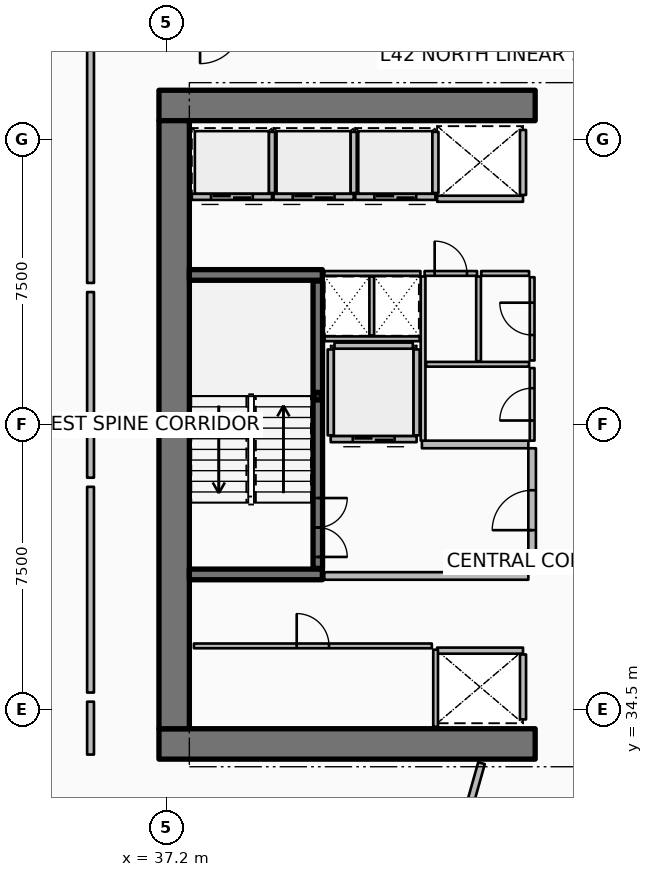
"""IFC4 building model, lengths in metres.
Left out: names, types, materials, properties, quantities, classifications, styles, units other than length and angle.
Written with IfcOpenShell. Run it as: python <this file> out.ifc"""

import sys

from ifc_helpers import new_model, si_unit, direction, frame, frame_2d, origin, origin_2d, place, context, subcontext, project, spatial, rectangle, hollow_rectangle, extrude, element, fill, save


model = new_model("IFC4")
c1 = context("Model", 3, precision=1e-05, world=origin(), true_north=direction((0.0, 1.0)))
c2 = subcontext(c1, "Body", "Model", "MODEL_VIEW")
j1 = project(units=[si_unit("LENGTHUNIT", "METRE"), si_unit("PLANEANGLEUNIT", "RADIAN")], contexts=[c1])
p1 = place(None, origin())
s1 = spatial("IfcSite", under=j1, at=p1, CompositionType="ELEMENT")
p2 = place(p1, origin())
s2 = spatial("IfcBuilding", under=s1, at=p2, CompositionType="ELEMENT")
p3 = place(p2, frame((0.0, 0.0, 169.05)))
s3 = spatial("IfcBuildingStorey", under=s2, at=p3, CompositionType="ELEMENT", Elevation=169.05)
for number, where, z_axis, x_axis in (
    (1, (37.0, 33.6, 0.0), (0.0, 0.0, 1.0), (1.0, 0.0, 0.0)),
    (2, (37.0, 50.4, 0.0), (0.0, 0.0, 1.0), (1.0, 0.0, 0.0)),
):
    element("IfcWall", number, at=place(p3, frame(where, z_axis=z_axis, x_axis=x_axis)), inside=s3, PredefinedType="SHEAR", context=c2, shape_type="SweptSolid", body=[
        extrude(rectangle(XDim=9.9, YDim=0.8, at=frame_2d((4.95, 0.0))), origin(), (0.0, 0.0, 1.0), 3.75),
    ])
p4 = place(p3, frame((37.4, 34.0, 0.0), z_axis=(0.0, 0.0, 1.0), x_axis=(0.0, 1.0, 0.0)))
e3 = element("IfcWall", 3, at=p4, inside=s3, PredefinedType="SHEAR", context=c2, shape_type="SweptSolid", body=[
    extrude(rectangle(XDim=16.0, YDim=0.8, at=frame_2d((8.0, 0.0))), origin(), (0.0, 0.0, 1.0), 3.75),
])
for number, where, z_axis, x_axis in (
    (4, (37.8, 38.06, 0.0), (0.0, 0.0, 1.0), (1.0, 0.0, 0.0)),
    (5, (37.8, 45.94, 0.0), (0.0, 0.0, 1.0), (1.0, 0.0, 0.0)),
):
    element("IfcWall", number, at=place(p3, frame(where, z_axis=z_axis, x_axis=x_axis)), inside=s3, PredefinedType="SHEAR", context=c2, shape_type="SweptSolid", body=[
        extrude(rectangle(XDim=3.5, YDim=0.28, at=frame_2d((1.75, 0.0))), origin(), (0.0, 0.0, 1.0), 3.75),
    ])
p5 = place(p3, frame((41.18, 42.75, 0.0), z_axis=(0.0, 0.0, 1.0), x_axis=(1.0, 0.0, 0.0)))
e6 = element("IfcColumn", 6, at=p5, inside=s3, PredefinedType="COLUMN", context=c2, shape_type="SweptSolid", body=[
    extrude(hollow_rectangle(XDim=0.2, YDim=0.2, WallThickness=0.01, InnerFilletRadius=0.01, OuterFilletRadius=0.02, at=origin_2d()), origin(), (0.0, 0.0, 1.0), 1.67),
])
p6 = place(p3, frame((41.18, 38.22, 0.0), z_axis=(0.0, 0.0, 1.0), x_axis=(0.0, 1.0, 0.0)))
e7 = element("IfcWall", 7, at=p6, inside=s3, PredefinedType="SOLIDWALL", context=c2, shape_type="SweptSolid", body=[
    extrude(rectangle(XDim=7.56, YDim=0.25, at=frame_2d((3.78, 0.0))), origin(), (0.0, 0.0, 1.0), 3.5),
])
p7 = place(p6, frame((0.3, 0.0, 0.0)))
e8 = element("IfcOpeningElement", 8, at=p7, cuts=e7, PredefinedType="OPENING", context=c2, shape_type="SweptSolid", body=[
    extrude(rectangle(XDim=1.55, YDim=2.15, at=frame_2d((0.775, 1.075))), frame((0.0, 0.135, 0.0), z_axis=(0.0, -1.0, 0.0), x_axis=(1.0, 0.0, 0.0)), (0.0, 0.0, 1.0), 0.27),
])
p8 = place(p3, frame((39.975, 47.995, 0.0), z_axis=(0.0, 0.0, 1.0), x_axis=(-1.0, 0.0, 0.0)))
e9 = element("IfcWall", 9, at=p8, inside=s3, PredefinedType="PARTITIONING", context=c2, shape_type="SweptSolid", body=[
    extrude(rectangle(XDim=2.11, YDim=0.16, at=frame_2d((1.055, 0.0))), origin(), (0.0, 0.0, 1.0), 3.5),
])
p9 = place(p8, frame((0.505, 0.0, 0.0)))
e10 = element("IfcOpeningElement", 10, at=p9, cuts=e9, PredefinedType="OPENING", context=c2, shape_type="SweptSolid", body=[
    extrude(rectangle(XDim=1.1, YDim=2.1, at=frame_2d((0.55, 1.05))), frame((0.0, 0.09, 0.0), z_axis=(0.0, -1.0, 0.0), x_axis=(1.0, 0.0, 0.0)), (0.0, 0.0, 1.0), 0.18),
])
p10 = place(p3, frame((39.975, 48.095, 0.0), z_axis=(0.0, 0.0, 1.0), x_axis=(0.0, 1.0, 0.0)))
e11 = element("IfcWall", 11, at=p10, inside=s3, PredefinedType="PARTITIONING", context=c2, shape_type="SweptSolid", body=[
    extrude(rectangle(XDim=1.61, YDim=0.16, at=frame_2d((0.805, 0.0))), origin(), (0.0, 0.0, 1.0), 3.5),
])
p11 = place(p3, frame((42.125, 47.995, 0.0), z_axis=(0.0, 0.0, 1.0), x_axis=(-1.0, 0.0, 0.0)))
e12 = element("IfcWall", 12, at=p11, inside=s3, PredefinedType="PARTITIONING", context=c2, shape_type="SweptSolid", body=[
    extrude(rectangle(XDim=2.11, YDim=0.16, at=frame_2d((1.055, 0.0))), origin(), (0.0, 0.0, 1.0), 3.5),
])
p12 = place(p11, frame((0.505, 0.0, 0.0)))
e13 = element("IfcOpeningElement", 13, at=p12, cuts=e12, PredefinedType="OPENING", context=c2, shape_type="SweptSolid", body=[
    extrude(rectangle(XDim=1.1, YDim=2.1, at=frame_2d((0.55, 1.05))), frame((0.0, 0.09, 0.0), z_axis=(0.0, -1.0, 0.0), x_axis=(1.0, 0.0, 0.0)), (0.0, 0.0, 1.0), 0.18),
])
p13 = place(p3, frame((42.125, 48.095, 0.0), z_axis=(0.0, 0.0, 1.0), x_axis=(0.0, 1.0, 0.0)))
e14 = element("IfcWall", 14, at=p13, inside=s3, PredefinedType="PARTITIONING", context=c2, shape_type="SweptSolid", body=[
    extrude(rectangle(XDim=1.61, YDim=0.16, at=frame_2d((0.805, 0.0))), origin(), (0.0, 0.0, 1.0), 3.5),
])
p14 = place(p3, frame((44.275, 47.995, 0.0), z_axis=(0.0, 0.0, 1.0), x_axis=(-1.0, 0.0, 0.0)))
e15 = element("IfcWall", 15, at=p14, inside=s3, PredefinedType="PARTITIONING", context=c2, shape_type="SweptSolid", body=[
    extrude(rectangle(XDim=2.11, YDim=0.16, at=frame_2d((1.055, 0.0))), origin(), (0.0, 0.0, 1.0), 3.5),
])
p15 = place(p14, frame((0.505, 0.0, 0.0)))
e16 = element("IfcOpeningElement", 16, at=p15, cuts=e15, PredefinedType="OPENING", context=c2, shape_type="SweptSolid", body=[
    extrude(rectangle(XDim=1.1, YDim=2.1, at=frame_2d((0.55, 1.05))), frame((0.0, 0.09, 0.0), z_axis=(0.0, -1.0, 0.0), x_axis=(1.0, 0.0, 0.0)), (0.0, 0.0, 1.0), 0.18),
])
p16 = place(p3, frame((44.275, 48.095, 0.0), z_axis=(0.0, 0.0, 1.0), x_axis=(0.0, 1.0, 0.0)))
e17 = element("IfcWall", 17, at=p16, inside=s3, PredefinedType="PARTITIONING", context=c2, shape_type="SweptSolid", body=[
    extrude(rectangle(XDim=1.61, YDim=0.16, at=frame_2d((0.805, 0.0))), origin(), (0.0, 0.0, 1.0), 3.5),
])
p17 = place(p3, frame((46.58, 47.945, 0.0), z_axis=(0.0, 0.0, 1.0), x_axis=(-1.0, 0.0, 0.0)))
e18 = element("IfcWall", 18, at=p17, inside=s3, PredefinedType="PARTITIONING", context=c2, shape_type="SweptSolid", body=[
    extrude(rectangle(XDim=2.26, YDim=0.16, at=frame_2d((1.13, 0.0))), origin(), (0.0, 0.0, 1.0), 3.5),
])
p18 = place(p3, frame((46.58, 48.045, 0.0), z_axis=(0.0, 0.0, 1.0), x_axis=(0.0, 1.0, 0.0)))
e19 = element("IfcWall", 19, at=p18, inside=s3, PredefinedType="PARTITIONING", context=c2, shape_type="SweptSolid", body=[
    extrude(rectangle(XDim=1.71, YDim=0.16, at=frame_2d((0.855, 0.0))), origin(), (0.0, 0.0, 1.0), 3.5),
])
p19 = place(p3, frame((44.32, 36.055, 0.0), z_axis=(0.0, 0.0, 1.0), x_axis=(1.0, 0.0, 0.0)))
e20 = element("IfcWall", 20, at=p19, inside=s3, PredefinedType="PARTITIONING", context=c2, shape_type="SweptSolid", body=[
    extrude(rectangle(XDim=2.26, YDim=0.16, at=frame_2d((1.13, 0.0))), origin(), (0.0, 0.0, 1.0), 3.5),
])
p20 = place(p3, frame((46.58, 34.245, 0.0), z_axis=(0.0, 0.0, 1.0), x_axis=(0.0, 1.0, 0.0)))
e21 = element("IfcWall", 21, at=p20, inside=s3, PredefinedType="PARTITIONING", context=c2, shape_type="SweptSolid", body=[
    extrude(rectangle(XDim=1.71, YDim=0.16, at=frame_2d((0.855, 0.0))), origin(), (0.0, 0.0, 1.0), 3.5),
])
p21 = place(p3, frame((43.78, 41.62, 0.0), z_axis=(0.0, 0.0, 1.0), x_axis=(-1.0, 0.0, 0.0)))
e22 = element("IfcWall", 22, at=p21, inside=s3, PredefinedType="PARTITIONING", context=c2, shape_type="SweptSolid", body=[
    extrude(rectangle(XDim=2.26, YDim=0.16, at=frame_2d((1.13, 0.0))), origin(), (0.0, 0.0, 1.0), 3.5),
])
p22 = place(p21, frame((0.58, 0.0, 0.0)))
e23 = element("IfcOpeningElement", 23, at=p22, cuts=e22, PredefinedType="OPENING", context=c2, shape_type="SweptSolid", body=[
    extrude(rectangle(XDim=1.1, YDim=2.1, at=frame_2d((0.55, 1.05))), frame((0.0, 0.09, 0.0), z_axis=(0.0, -1.0, 0.0), x_axis=(1.0, 0.0, 0.0)), (0.0, 0.0, 1.0), 0.18),
])
for number, where, z_axis, x_axis in (
    (24, (43.78, 41.72, 0.0), (0.0, 0.0, 1.0), (0.0, 1.0, 0.0)),
    (25, (41.52, 41.72, 0.0), (0.0, 0.0, 1.0), (0.0, 1.0, 0.0)),
):
    element("IfcWall", number, at=place(p3, frame(where, z_axis=z_axis, x_axis=x_axis)), inside=s3, PredefinedType="PARTITIONING", context=c2, shape_type="SweptSolid", body=[
        extrude(rectangle(XDim=2.26, YDim=0.16, at=frame_2d((1.13, 0.0))), origin(), (0.0, 0.0, 1.0), 3.5),
    ])
p23 = place(p3, frame((41.62, 44.08, 0.0), z_axis=(0.0, 0.0, 1.0), x_axis=(1.0, 0.0, 0.0)))
e26 = element("IfcWall", 26, at=p23, inside=s3, PredefinedType="PARTITIONING", context=c2, shape_type="SweptSolid", body=[
    extrude(rectangle(XDim=2.06, YDim=0.16, at=frame_2d((1.03, 0.0))), origin(), (0.0, 0.0, 1.0), 3.5),
])
p24 = place(p3, frame((44.28, 34.05, 0.0), z_axis=(0.0, 0.0, 1.0), x_axis=(0.0, 1.0, 0.0)))
e27 = element("IfcWall", 27, at=p24, inside=s3, PredefinedType="PARTITIONING", context=c2, shape_type="SweptSolid", body=[
    extrude(rectangle(XDim=2.03, YDim=0.125, at=frame_2d((1.015, 0.0))), origin(), (0.0, 0.0, 1.0), 2.94),
])
p25 = place(p3, frame((37.92, 36.18, 0.0), z_axis=(0.0, 0.0, 1.0), x_axis=(1.0, 0.0, 0.0)))
e28 = element("IfcWall", 28, at=p25, inside=s3, PredefinedType="PARTITIONING", context=c2, shape_type="SweptSolid", body=[
    extrude(rectangle(XDim=6.26, YDim=0.125, at=frame_2d((3.13, 0.0))), origin(), (0.0, 0.0, 1.0), 2.94),
])
p26 = place(p25, frame((2.705, 0.0, 0.0)))
e29 = element("IfcOpeningElement", 29, at=p26, cuts=e28, PredefinedType="OPENING", context=c2, shape_type="SweptSolid", body=[
    extrude(rectangle(XDim=0.85, YDim=2.06, at=frame_2d((0.425, 1.03))), frame((0.0, 0.073, 0.0), z_axis=(0.0, -1.0, 0.0), x_axis=(1.0, 0.0, 0.0)), (0.0, 0.0, 1.0), 0.145),
])
p27 = place(p3, frame((41.35, 38.02, 0.0), z_axis=(0.0, 0.0, 1.0), x_axis=(1.0, 0.0, 0.0)))
e30 = element("IfcWall", 30, at=p27, inside=s3, PredefinedType="PARTITIONING", context=c2, shape_type="SweptSolid", body=[
    extrude(rectangle(XDim=5.37, YDim=0.2, at=frame_2d((2.685, 0.0))), origin(), (0.0, 0.0, 1.0), 3.5),
])
p28 = place(p3, frame((43.92, 41.48, 0.0), z_axis=(0.0, 0.0, 1.0), x_axis=(1.0, 0.0, 0.0)))
e31 = element("IfcWall", 31, at=p28, inside=s3, PredefinedType="PARTITIONING", context=c2, shape_type="SweptSolid", body=[
    extrude(rectangle(XDim=2.8, YDim=0.2, at=frame_2d((1.4, 0.0))), origin(), (0.0, 0.0, 1.0), 3.5),
])
p29 = place(p3, frame((46.82, 38.12, 0.0), z_axis=(0.0, 0.0, 1.0), x_axis=(0.0, 1.0, 0.0)))
e32 = element("IfcWall", 32, at=p29, inside=s3, PredefinedType="PARTITIONING", context=c2, shape_type="SweptSolid", body=[
    extrude(rectangle(XDim=3.26, YDim=0.2, at=frame_2d((1.63, 0.0))), origin(), (0.0, 0.0, 1.0), 3.5),
])
p30 = place(p29, frame((1.105, 0.0, 0.0)))
e33 = element("IfcOpeningElement", 33, at=p30, cuts=e32, PredefinedType="OPENING", context=c2, shape_type="SweptSolid", body=[
    extrude(rectangle(XDim=1.05, YDim=2.1, at=frame_2d((0.525, 1.05))), frame((0.0, 0.11, 0.0), z_axis=(0.0, -1.0, 0.0), x_axis=(1.0, 0.0, 0.0)), (0.0, 0.0, 1.0), 0.22),
])
p31 = place(p3, frame((41.36, 44.26, 0.0), z_axis=(0.0, 0.0, 1.0), x_axis=(1.0, 0.0, 0.0)))
e34 = element("IfcWall", 34, at=p31, inside=s3, PredefinedType="PARTITIONING", context=c2, shape_type="SweptSolid", body=[
    extrude(rectangle(XDim=2.5, YDim=0.125, at=frame_2d((1.25, 0.0))), origin(), (0.0, 0.0, 1.0), 2.94),
])
p32 = place(p3, frame((42.6, 44.35, 0.0), z_axis=(0.0, 0.0, 1.0), x_axis=(0.0, 1.0, 0.0)))
e35 = element("IfcWall", 35, at=p32, inside=s3, PredefinedType="PARTITIONING", context=c2, shape_type="SweptSolid", body=[
    extrude(rectangle(XDim=1.55, YDim=0.125, at=frame_2d((0.775, 0.0))), origin(), (0.0, 0.0, 1.0), 2.94),
])
p33 = place(p3, frame((43.95, 41.58, 0.0), z_axis=(0.0, 0.0, 1.0), x_axis=(0.0, 1.0, 0.0)))
e36 = element("IfcWall", 36, at=p33, inside=s3, PredefinedType="PARTITIONING", context=c2, shape_type="SweptSolid", body=[
    extrude(rectangle(XDim=4.32, YDim=0.125, at=frame_2d((2.16, 0.0))), origin(), (0.0, 0.0, 1.0), 2.94),
])
p34 = place(p3, frame((44.03, 43.59, 0.0), z_axis=(0.0, 0.0, 1.0), x_axis=(1.0, 0.0, 0.0)))
e37 = element("IfcWall", 37, at=p34, inside=s3, PredefinedType="PARTITIONING", context=c2, shape_type="SweptSolid", body=[
    extrude(rectangle(XDim=2.71, YDim=0.125, at=frame_2d((1.355, 0.0))), origin(), (0.0, 0.0, 1.0), 2.94),
])
p35 = place(p3, frame((45.41, 43.67, 0.0), z_axis=(0.0, 0.0, 1.0), x_axis=(0.0, 1.0, 0.0)))
e38 = element("IfcWall", 38, at=p35, inside=s3, PredefinedType="PARTITIONING", context=c2, shape_type="SweptSolid", body=[
    extrude(rectangle(XDim=2.23, YDim=0.125, at=frame_2d((1.115, 0.0))), origin(), (0.0, 0.0, 1.0), 2.94),
])
p36 = place(p3, frame((46.82, 41.58, 0.0), z_axis=(0.0, 0.0, 1.0), x_axis=(0.0, 1.0, 0.0)))
e39 = element("IfcWall", 39, at=p36, inside=s3, PredefinedType="PARTITIONING", context=c2, shape_type="SweptSolid", body=[
    extrude(rectangle(XDim=1.91, YDim=0.125, at=frame_2d((0.955, 0.0))), origin(), (0.0, 0.0, 1.0), 2.94),
])
p37 = place(p36, frame((0.53, 0.0, 0.0)))
e40 = element("IfcOpeningElement", 40, at=p37, cuts=e39, PredefinedType="OPENING", context=c2, shape_type="SweptSolid", body=[
    extrude(rectangle(XDim=0.85, YDim=2.06, at=frame_2d((0.425, 1.03))), frame((0.0, 0.073, 0.0), z_axis=(0.0, -1.0, 0.0), x_axis=(1.0, 0.0, 0.0)), (0.0, 0.0, 1.0), 0.145),
])
p38 = place(p3, frame((46.82, 43.69, 0.0), z_axis=(0.0, 0.0, 1.0), x_axis=(0.0, 1.0, 0.0)))
e41 = element("IfcWall", 41, at=p38, inside=s3, PredefinedType="PARTITIONING", context=c2, shape_type="SweptSolid", body=[
    extrude(rectangle(XDim=2.19, YDim=0.125, at=frame_2d((1.095, 0.0))), origin(), (0.0, 0.0, 1.0), 2.94),
])
p39 = place(p38, frame((0.67, 0.0, 0.0)))
e42 = element("IfcOpeningElement", 42, at=p39, cuts=e41, PredefinedType="OPENING", context=c2, shape_type="SweptSolid", body=[
    extrude(rectangle(XDim=0.85, YDim=2.06, at=frame_2d((0.425, 1.03))), frame((0.0, 0.073, 0.0), z_axis=(0.0, -1.0, 0.0), x_axis=(1.0, 0.0, 0.0)), (0.0, 0.0, 1.0), 0.145),
])
p40 = place(p3, frame((41.35, 45.98, 0.0), z_axis=(0.0, 0.0, 1.0), x_axis=(1.0, 0.0, 0.0)))
e43 = element("IfcWall", 43, at=p40, inside=s3, PredefinedType="PARTITIONING", context=c2, shape_type="SweptSolid", body=[
    extrude(rectangle(XDim=2.53, YDim=0.125, at=frame_2d((1.265, 0.0))), origin(), (0.0, 0.0, 1.0), 2.94),
])
p41 = place(p3, frame((43.99, 45.98, 0.0), z_axis=(0.0, 0.0, 1.0), x_axis=(1.0, 0.0, 0.0)))
e44 = element("IfcWall", 44, at=p41, inside=s3, PredefinedType="PARTITIONING", context=c2, shape_type="SweptSolid", body=[
    extrude(rectangle(XDim=1.38, YDim=0.125, at=frame_2d((0.69, 0.0))), origin(), (0.0, 0.0, 1.0), 2.94),
])
p42 = place(p41, frame((0.265, 0.0, 0.0)))
e45 = element("IfcOpeningElement", 45, at=p42, cuts=e44, PredefinedType="OPENING", context=c2, shape_type="SweptSolid", body=[
    extrude(rectangle(XDim=0.85, YDim=2.06, at=frame_2d((0.425, 1.03))), frame((0.0, 0.073, 0.0), z_axis=(0.0, -1.0, 0.0), x_axis=(1.0, 0.0, 0.0)), (0.0, 0.0, 1.0), 0.145),
])
p43 = place(p3, frame((45.48, 45.98, 0.0), z_axis=(0.0, 0.0, 1.0), x_axis=(1.0, 0.0, 0.0)))
e46 = element("IfcWall", 46, at=p43, inside=s3, PredefinedType="PARTITIONING", context=c2, shape_type="SweptSolid", body=[
    extrude(rectangle(XDim=1.26, YDim=0.125, at=frame_2d((0.63, 0.0))), origin(), (0.0, 0.0, 1.0), 2.94),
])
p44 = place(p3, frame((45.488, 33.094, 0.0), z_axis=(0.0, 0.0, 1.0), x_axis=(-0.271442952208, -0.962454530717, 0.0)))
e47 = element("IfcWall", 47, at=p44, inside=s3, PredefinedType="PARTITIONING", context=c2, shape_type="SweptSolid", body=[
    extrude(rectangle(XDim=14.486, YDim=0.18, at=frame_2d((7.243, 0.0))), origin(), (0.0, 0.0, 1.0), 2.94),
])
p45 = place(p3, frame((35.2, 51.971, 0.0), z_axis=(0.0, 0.0, 1.0), x_axis=(0.0, -1.0, 0.0)))
e48 = element("IfcWall", 48, at=p45, inside=s3, PredefinedType="PARTITIONING", context=c2, shape_type="SweptSolid", body=[
    extrude(rectangle(XDim=6.241, YDim=0.18, at=frame_2d((3.12, 0.0))), origin(), (0.0, 0.0, 1.0), 2.94),
])
p46 = place(p3, frame((35.2, 45.49, 0.0), z_axis=(0.0, 0.0, 1.0), x_axis=(0.0, -1.0, 0.0)))
e49 = element("IfcWall", 49, at=p46, inside=s3, PredefinedType="PARTITIONING", context=c2, shape_type="SweptSolid", body=[
    extrude(rectangle(XDim=4.885, YDim=0.18, at=frame_2d((2.442, 0.0))), origin(), (0.0, 0.0, 1.0), 2.94),
])
p47 = place(p3, frame((35.2, 40.365, 0.0), z_axis=(0.0, 0.0, 1.0), x_axis=(0.0, -1.0, 0.0)))
e50 = element("IfcWall", 50, at=p47, inside=s3, PredefinedType="PARTITIONING", context=c2, shape_type="SweptSolid", body=[
    extrude(rectangle(XDim=5.413, YDim=0.18, at=frame_2d((2.707, 0.0))), origin(), (0.0, 0.0, 1.0), 2.94),
])
p48 = place(p3, frame((35.2, 34.712, 0.0), z_axis=(0.0, 0.0, 1.0), x_axis=(0.0, -1.0, 0.0)))
e51 = element("IfcWall", 51, at=p48, inside=s3, PredefinedType="PARTITIONING", context=c2, shape_type="SweptSolid", body=[
    extrude(rectangle(XDim=1.392, YDim=0.18, at=frame_2d((0.696, 0.0))), origin(), (0.0, 0.0, 1.0), 2.94),
])
p49 = place(p3, frame((31.983, 32.907, 0.0), z_axis=(0.0, 0.0, 1.0), x_axis=(0.649447060425, -0.76040680935, 0.0)))
e52 = element("IfcWall", 52, at=p49, inside=s3, PredefinedType="PARTITIONING", context=c2, shape_type="SweptSolid", body=[
    extrude(rectangle(XDim=6.975, YDim=0.125, at=frame_2d((3.487, 0.0))), origin(), (0.0, 0.0, 1.0), 2.94),
])
p50 = place(p49, frame((3.037, 0.0, 0.0)))
e53 = element("IfcOpeningElement", 53, at=p50, cuts=e52, PredefinedType="OPENING", context=c2, shape_type="SweptSolid", body=[
    extrude(rectangle(XDim=0.9, YDim=2.08, at=frame_2d((0.45, 1.04))), frame((0.0, 0.073, 0.0), z_axis=(0.0, -1.0, 0.0), x_axis=(1.0, 0.0, 0.0)), (0.0, 0.0, 1.0), 0.145),
])
p51 = place(p7, origin())
e54 = element("IfcDoor", 54, at=p51, inside=s3, OperationType="DOUBLE_DOOR_SINGLE_SWING", PredefinedType="DOOR", context=c2, shape_type="SweptSolid", body=[
    extrude(rectangle(XDim=1.55, YDim=2.15, at=frame_2d((0.775, 1.075))), frame((0.0, 0.025, 0.0), z_axis=(0.0, -1.0, 0.0), x_axis=(1.0, 0.0, 0.0)), (0.0, 0.0, 1.0), 0.05),
])
fill(e8, e54)
p52 = place(p9, origin())
e55 = element("IfcDoor", 55, at=p52, inside=s3, OperationType="DOUBLE_DOOR_SLIDING", PredefinedType="DOOR", context=c2, shape_type="SweptSolid", body=[
    extrude(rectangle(XDim=1.1, YDim=2.1, at=frame_2d((0.55, 1.05))), frame((0.0, 0.025, 0.0), z_axis=(0.0, -1.0, 0.0), x_axis=(1.0, 0.0, 0.0)), (0.0, 0.0, 1.0), 0.05),
])
fill(e10, e55)
p53 = place(p12, origin())
e56 = element("IfcDoor", 56, at=p53, inside=s3, OperationType="DOUBLE_DOOR_SLIDING", PredefinedType="DOOR", context=c2, shape_type="SweptSolid", body=[
    extrude(rectangle(XDim=1.1, YDim=2.1, at=frame_2d((0.55, 1.05))), frame((0.0, 0.025, 0.0), z_axis=(0.0, -1.0, 0.0), x_axis=(1.0, 0.0, 0.0)), (0.0, 0.0, 1.0), 0.05),
])
fill(e13, e56)
p54 = place(p15, origin())
e57 = element("IfcDoor", 57, at=p54, inside=s3, OperationType="DOUBLE_DOOR_SLIDING", PredefinedType="DOOR", context=c2, shape_type="SweptSolid", body=[
    extrude(rectangle(XDim=1.1, YDim=2.1, at=frame_2d((0.55, 1.05))), frame((0.0, 0.025, 0.0), z_axis=(0.0, -1.0, 0.0), x_axis=(1.0, 0.0, 0.0)), (0.0, 0.0, 1.0), 0.05),
])
fill(e16, e57)
p55 = place(p22, origin())
e58 = element("IfcDoor", 58, at=p55, inside=s3, OperationType="DOUBLE_DOOR_SLIDING", PredefinedType="DOOR", context=c2, shape_type="SweptSolid", body=[
    extrude(rectangle(XDim=1.1, YDim=2.1, at=frame_2d((0.55, 1.05))), frame((0.0, 0.025, 0.0), z_axis=(0.0, -1.0, 0.0), x_axis=(1.0, 0.0, 0.0)), (0.0, 0.0, 1.0), 0.05),
])
fill(e23, e58)
p56 = place(p26, origin())
e59 = element("IfcDoor", 59, at=p56, inside=s3, OperationType="SINGLE_SWING_LEFT", PredefinedType="DOOR", context=c2, shape_type="SweptSolid", body=[
    extrude(rectangle(XDim=0.85, YDim=2.06, at=frame_2d((0.425, 1.03))), frame((0.0, 0.025, 0.0), z_axis=(0.0, -1.0, 0.0), x_axis=(1.0, 0.0, 0.0)), (0.0, 0.0, 1.0), 0.05),
])
fill(e29, e59)
p57 = place(p30, origin())
e60 = element("IfcDoor", 60, at=p57, inside=s3, OperationType="SINGLE_SWING_LEFT", PredefinedType="DOOR", context=c2, shape_type="SweptSolid", body=[
    extrude(rectangle(XDim=1.05, YDim=2.1, at=frame_2d((0.525, 1.05))), frame((0.0, 0.025, 0.0), z_axis=(0.0, -1.0, 0.0), x_axis=(1.0, 0.0, 0.0)), (0.0, 0.0, 1.0), 0.05),
])
fill(e33, e60)
p58 = place(p37, origin())
e61 = element("IfcDoor", 61, at=p58, inside=s3, OperationType="SINGLE_SWING_LEFT", PredefinedType="DOOR", context=c2, shape_type="SweptSolid", body=[
    extrude(rectangle(XDim=0.85, YDim=2.06, at=frame_2d((0.425, 1.03))), frame((0.0, 0.025, 0.0), z_axis=(0.0, -1.0, 0.0), x_axis=(1.0, 0.0, 0.0)), (0.0, 0.0, 1.0), 0.05),
])
fill(e40, e61)
p59 = place(p39, origin())
e62 = element("IfcDoor", 62, at=p59, inside=s3, OperationType="SINGLE_SWING_RIGHT", PredefinedType="DOOR", context=c2, shape_type="SweptSolid", body=[
    extrude(rectangle(XDim=0.85, YDim=2.06, at=frame_2d((0.425, 1.03))), frame((0.0, 0.025, 0.0), z_axis=(0.0, -1.0, 0.0), x_axis=(1.0, 0.0, 0.0)), (0.0, 0.0, 1.0), 0.05),
])
fill(e42, e62)
p60 = place(p42, origin())
e63 = element("IfcDoor", 63, at=p60, inside=s3, OperationType="SINGLE_SWING_LEFT", PredefinedType="DOOR", context=c2, shape_type="SweptSolid", body=[
    extrude(rectangle(XDim=0.85, YDim=2.06, at=frame_2d((0.425, 1.03))), frame((0.0, 0.025, 0.0), z_axis=(0.0, -1.0, 0.0), x_axis=(1.0, 0.0, 0.0)), (0.0, 0.0, 1.0), 0.05),
])
fill(e45, e63)
save(model, sys.argv[1])
